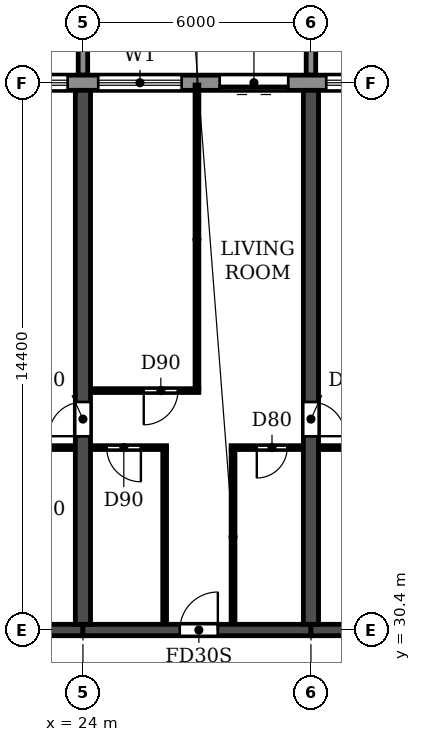
"""IFC4 building model, lengths in metres.
Left out: names, types, materials, properties, quantities, classifications, styles, units other than length and angle.
Written with IfcOpenShell. Run it as: python <this file> out.ifc"""

import sys

from ifc_helpers import new_model, si_unit, direction, frame, frame_2d, origin, place, context, subcontext, project, spatial, polyline, rectangle, outline, extrude, source, transform, mapped, element, fill, save


model = new_model("IFC4")
c1 = context("Model", 3, precision=1e-05, world=origin(), true_north=direction((0.0, 1.0)))
c2 = subcontext(c1, "Body", "Model", "MODEL_VIEW")
j1 = project(units=[si_unit("LENGTHUNIT", "METRE"), si_unit("PLANEANGLEUNIT", "RADIAN")], contexts=[c1])
p1 = place(None, origin())
s1 = spatial("IfcSite", under=j1, at=p1, CompositionType="ELEMENT")
p2 = place(p1, origin())
s2 = spatial("IfcBuilding", under=s1, at=p2, CompositionType="ELEMENT")
p3 = place(p2, frame((0.0, 0.0, 33.3)))
s3 = spatial("IfcBuildingStorey", under=s2, at=p3, CompositionType="ELEMENT", Elevation=33.3)
p4 = place(p3, frame((24.0, 30.55, 0.0), z_axis=(0.0, 0.0, 1.0), x_axis=(0.0, 1.0, 0.0)))
e1 = element("IfcWall", 1, at=p4, inside=s3, PredefinedType="SHEAR", context=c2, shape_type="SweptSolid", body=[
    extrude(rectangle(XDim=14.05, YDim=0.4, at=frame_2d((7.025, 0.0))), origin(), (0.0, 0.0, 1.0), 3.05),
])
p5 = place(p4, frame((4.95, 0.0, 0.0)))
e2 = element("IfcOpeningElement", 2, at=p5, cuts=e1, PredefinedType="OPENING", context=c2, shape_type="SweptSolid", body=[
    extrude(rectangle(XDim=0.9, YDim=2.1, at=frame_2d((0.45, 1.05))), frame((0.0, 0.21, 0.0), z_axis=(0.0, -1.0, 0.0), x_axis=(1.0, 0.0, 0.0)), (0.0, 0.0, 1.0), 0.42),
])
p6 = place(p3, frame((30.0, 30.55, 0.0), z_axis=(0.0, 0.0, 1.0), x_axis=(0.0, 1.0, 0.0)))
e3 = element("IfcWall", 3, at=p6, inside=s3, PredefinedType="SHEAR", context=c2, shape_type="SweptSolid", body=[
    extrude(rectangle(XDim=14.05, YDim=0.4, at=frame_2d((7.025, 0.0))), origin(), (0.0, 0.0, 1.0), 3.05),
])
p7 = place(p6, frame((4.95, 0.0, 0.0)))
e4 = element("IfcOpeningElement", 4, at=p7, cuts=e3, PredefinedType="OPENING", context=c2, shape_type="SweptSolid", body=[
    extrude(rectangle(XDim=0.9, YDim=2.1, at=frame_2d((0.45, 1.05))), frame((0.0, 0.21, 0.0), z_axis=(0.0, -1.0, 0.0), x_axis=(1.0, 0.0, 0.0)), (0.0, 0.0, 1.0), 0.42),
])
p8 = place(p3, frame((18.0, 30.4, 0.0), z_axis=(0.0, 0.0, 1.0), x_axis=(1.0, 0.0, 0.0)))
e5 = element("IfcWall", 5, at=p8, inside=s3, PredefinedType="SHEAR", context=c2, shape_type="SweptSolid", body=[
    extrude(rectangle(XDim=6.0, YDim=0.3, at=frame_2d((3.0, 0.0))), origin(), (0.0, 0.0, 1.0), 2.45),
])
p9 = place(p3, frame((24.0, 30.4, 0.0), z_axis=(0.0, 0.0, 1.0), x_axis=(1.0, 0.0, 0.0)))
e6 = element("IfcWall", 6, at=p9, inside=s3, PredefinedType="SHEAR", context=c2, shape_type="SweptSolid", body=[
    extrude(rectangle(XDim=6.0, YDim=0.3, at=frame_2d((3.0, 0.0))), origin(), (0.0, 0.0, 1.0), 2.45),
])
p10 = place(p9, frame((2.55, 0.0, 0.0)))
e7 = element("IfcOpeningElement", 7, at=p10, cuts=e6, PredefinedType="OPENING", context=c2, shape_type="SweptSolid", body=[
    extrude(rectangle(XDim=1.0, YDim=2.1, at=frame_2d((0.5, 1.05))), frame((0.0, 0.16, 0.0), z_axis=(0.0, -1.0, 0.0), x_axis=(1.0, 0.0, 0.0)), (0.0, 0.0, 1.0), 0.32),
])
p11 = place(p3, frame((30.0, 30.4, 0.0), z_axis=(0.0, 0.0, 1.0), x_axis=(1.0, 0.0, 0.0)))
e8 = element("IfcWall", 8, at=p11, inside=s3, PredefinedType="SHEAR", context=c2, shape_type="SweptSolid", body=[
    extrude(rectangle(XDim=6.0, YDim=0.3, at=frame_2d((3.0, 0.0))), origin(), (0.0, 0.0, 1.0), 2.45),
])
p12 = place(p3, frame((97.317, 44.8, 0.0), z_axis=(0.0, 0.0, 1.0), x_axis=(-1.0, 0.0, 0.0)))
e9 = element("IfcWall", 9, at=p12, inside=s3, PredefinedType="STANDARD", context=c2, shape_type="SweptSolid", body=[
    extrude(rectangle(XDim=92.634, YDim=0.4, at=frame_2d((46.317, 0.0))), origin(), (0.0, 0.0, 1.0), 3.05),
])
p13 = place(p12, frame((88.717, 0.0, 0.9)))
e10 = element("IfcOpeningElement", 10, at=p13, cuts=e9, PredefinedType="OPENING", context=c2, shape_type="SweptSolid", body=[
    extrude(rectangle(XDim=2.2, YDim=1.5, at=frame_2d((1.1, 0.75))), frame((0.0, 0.21, 0.0), z_axis=(0.0, -1.0, 0.0), x_axis=(1.0, 0.0, 0.0)), (0.0, 0.0, 1.0), 0.42),
])
p14 = place(p12, frame((85.917, 0.0, 0.0)))
e11 = element("IfcOpeningElement", 11, at=p14, cuts=e9, PredefinedType="OPENING", context=c2, shape_type="SweptSolid", body=[
    extrude(rectangle(XDim=1.8, YDim=2.4, at=frame_2d((0.9, 1.2))), frame((0.0, 0.21, 0.0), z_axis=(0.0, -1.0, 0.0), x_axis=(1.0, 0.0, 0.0)), (0.0, 0.0, 1.0), 0.42),
])
p15 = place(p12, frame((82.717, 0.0, 0.9)))
e12 = element("IfcOpeningElement", 12, at=p15, cuts=e9, PredefinedType="OPENING", context=c2, shape_type="SweptSolid", body=[
    extrude(rectangle(XDim=2.2, YDim=1.5, at=frame_2d((1.1, 0.75))), frame((0.0, 0.21, 0.0), z_axis=(0.0, -1.0, 0.0), x_axis=(1.0, 0.0, 0.0)), (0.0, 0.0, 1.0), 0.42),
])
p16 = place(p12, frame((79.917, 0.0, 0.0)))
e13 = element("IfcOpeningElement", 13, at=p16, cuts=e9, PredefinedType="OPENING", context=c2, shape_type="SweptSolid", body=[
    extrude(rectangle(XDim=1.8, YDim=2.4, at=frame_2d((0.9, 1.2))), frame((0.0, 0.21, 0.0), z_axis=(0.0, -1.0, 0.0), x_axis=(1.0, 0.0, 0.0)), (0.0, 0.0, 1.0), 0.42),
])
p17 = place(p12, frame((76.717, 0.0, 0.9)))
e14 = element("IfcOpeningElement", 14, at=p17, cuts=e9, PredefinedType="OPENING", context=c2, shape_type="SweptSolid", body=[
    extrude(rectangle(XDim=2.2, YDim=1.5, at=frame_2d((1.1, 0.75))), frame((0.0, 0.21, 0.0), z_axis=(0.0, -1.0, 0.0), x_axis=(1.0, 0.0, 0.0)), (0.0, 0.0, 1.0), 0.42),
])
p18 = place(p12, frame((73.717, 0.0, 0.9)))
e15 = element("IfcOpeningElement", 15, at=p18, cuts=e9, PredefinedType="OPENING", context=c2, shape_type="SweptSolid", body=[
    extrude(rectangle(XDim=2.2, YDim=1.5, at=frame_2d((1.1, 0.75))), frame((0.0, 0.21, 0.0), z_axis=(0.0, -1.0, 0.0), x_axis=(1.0, 0.0, 0.0)), (0.0, 0.0, 1.0), 0.42),
])
p19 = place(p12, frame((70.717, 0.0, 0.9)))
e16 = element("IfcOpeningElement", 16, at=p19, cuts=e9, PredefinedType="OPENING", context=c2, shape_type="SweptSolid", body=[
    extrude(rectangle(XDim=2.2, YDim=1.5, at=frame_2d((1.1, 0.75))), frame((0.0, 0.21, 0.0), z_axis=(0.0, -1.0, 0.0), x_axis=(1.0, 0.0, 0.0)), (0.0, 0.0, 1.0), 0.42),
])
p20 = place(p12, frame((67.917, 0.0, 0.0)))
e17 = element("IfcOpeningElement", 17, at=p20, cuts=e9, PredefinedType="OPENING", context=c2, shape_type="SweptSolid", body=[
    extrude(rectangle(XDim=1.8, YDim=2.4, at=frame_2d((0.9, 1.2))), frame((0.0, 0.21, 0.0), z_axis=(0.0, -1.0, 0.0), x_axis=(1.0, 0.0, 0.0)), (0.0, 0.0, 1.0), 0.42),
])
p21 = place(p12, frame((64.717, 0.0, 0.9)))
e18 = element("IfcOpeningElement", 18, at=p21, cuts=e9, PredefinedType="OPENING", context=c2, shape_type="SweptSolid", body=[
    extrude(rectangle(XDim=2.2, YDim=1.5, at=frame_2d((1.1, 0.75))), frame((0.0, 0.21, 0.0), z_axis=(0.0, -1.0, 0.0), x_axis=(1.0, 0.0, 0.0)), (0.0, 0.0, 1.0), 0.42),
])
p22 = place(p12, frame((61.717, 0.0, 0.9)))
e19 = element("IfcOpeningElement", 19, at=p22, cuts=e9, PredefinedType="OPENING", context=c2, shape_type="SweptSolid", body=[
    extrude(rectangle(XDim=2.2, YDim=1.5, at=frame_2d((1.1, 0.75))), frame((0.0, 0.21, 0.0), z_axis=(0.0, -1.0, 0.0), x_axis=(1.0, 0.0, 0.0)), (0.0, 0.0, 1.0), 0.42),
])
p23 = place(p12, frame((58.717, 0.0, 0.9)))
e20 = element("IfcOpeningElement", 20, at=p23, cuts=e9, PredefinedType="OPENING", context=c2, shape_type="SweptSolid", body=[
    extrude(rectangle(XDim=2.2, YDim=1.5, at=frame_2d((1.1, 0.75))), frame((0.0, 0.21, 0.0), z_axis=(0.0, -1.0, 0.0), x_axis=(1.0, 0.0, 0.0)), (0.0, 0.0, 1.0), 0.42),
])
p24 = place(p12, frame((55.917, 0.0, 0.0)))
e21 = element("IfcOpeningElement", 21, at=p24, cuts=e9, PredefinedType="OPENING", context=c2, shape_type="SweptSolid", body=[
    extrude(rectangle(XDim=1.8, YDim=2.4, at=frame_2d((0.9, 1.2))), frame((0.0, 0.21, 0.0), z_axis=(0.0, -1.0, 0.0), x_axis=(1.0, 0.0, 0.0)), (0.0, 0.0, 1.0), 0.42),
])
p25 = place(p12, frame((52.717, 0.0, 0.9)))
e22 = element("IfcOpeningElement", 22, at=p25, cuts=e9, PredefinedType="OPENING", context=c2, shape_type="SweptSolid", body=[
    extrude(rectangle(XDim=2.2, YDim=1.5, at=frame_2d((1.1, 0.75))), frame((0.0, 0.21, 0.0), z_axis=(0.0, -1.0, 0.0), x_axis=(1.0, 0.0, 0.0)), (0.0, 0.0, 1.0), 0.42),
])
p26 = place(p12, frame((49.717, 0.0, 0.9)))
e23 = element("IfcOpeningElement", 23, at=p26, cuts=e9, PredefinedType="OPENING", context=c2, shape_type="SweptSolid", body=[
    extrude(rectangle(XDim=2.2, YDim=1.5, at=frame_2d((1.1, 0.75))), frame((0.0, 0.21, 0.0), z_axis=(0.0, -1.0, 0.0), x_axis=(1.0, 0.0, 0.0)), (0.0, 0.0, 1.0), 0.42),
])
p27 = place(p12, frame((46.717, 0.0, 0.9)))
e24 = element("IfcOpeningElement", 24, at=p27, cuts=e9, PredefinedType="OPENING", context=c2, shape_type="SweptSolid", body=[
    extrude(rectangle(XDim=2.2, YDim=1.5, at=frame_2d((1.1, 0.75))), frame((0.0, 0.21, 0.0), z_axis=(0.0, -1.0, 0.0), x_axis=(1.0, 0.0, 0.0)), (0.0, 0.0, 1.0), 0.42),
])
p28 = place(p12, frame((43.917, 0.0, 0.0)))
e25 = element("IfcOpeningElement", 25, at=p28, cuts=e9, PredefinedType="OPENING", context=c2, shape_type="SweptSolid", body=[
    extrude(rectangle(XDim=1.8, YDim=2.4, at=frame_2d((0.9, 1.2))), frame((0.0, 0.21, 0.0), z_axis=(0.0, -1.0, 0.0), x_axis=(1.0, 0.0, 0.0)), (0.0, 0.0, 1.0), 0.42),
])
p29 = place(p12, frame((40.717, 0.0, 0.9)))
e26 = element("IfcOpeningElement", 26, at=p29, cuts=e9, PredefinedType="OPENING", context=c2, shape_type="SweptSolid", body=[
    extrude(rectangle(XDim=2.2, YDim=1.5, at=frame_2d((1.1, 0.75))), frame((0.0, 0.21, 0.0), z_axis=(0.0, -1.0, 0.0), x_axis=(1.0, 0.0, 0.0)), (0.0, 0.0, 1.0), 0.42),
])
p30 = place(p12, frame((37.717, 0.0, 0.9)))
e27 = element("IfcOpeningElement", 27, at=p30, cuts=e9, PredefinedType="OPENING", context=c2, shape_type="SweptSolid", body=[
    extrude(rectangle(XDim=2.2, YDim=1.5, at=frame_2d((1.1, 0.75))), frame((0.0, 0.21, 0.0), z_axis=(0.0, -1.0, 0.0), x_axis=(1.0, 0.0, 0.0)), (0.0, 0.0, 1.0), 0.42),
])
p31 = place(p12, frame((34.717, 0.0, 0.9)))
e28 = element("IfcOpeningElement", 28, at=p31, cuts=e9, PredefinedType="OPENING", context=c2, shape_type="SweptSolid", body=[
    extrude(rectangle(XDim=2.2, YDim=1.5, at=frame_2d((1.1, 0.75))), frame((0.0, 0.21, 0.0), z_axis=(0.0, -1.0, 0.0), x_axis=(1.0, 0.0, 0.0)), (0.0, 0.0, 1.0), 0.42),
])
p32 = place(p12, frame((31.917, 0.0, 0.0)))
e29 = element("IfcOpeningElement", 29, at=p32, cuts=e9, PredefinedType="OPENING", context=c2, shape_type="SweptSolid", body=[
    extrude(rectangle(XDim=1.8, YDim=2.4, at=frame_2d((0.9, 1.2))), frame((0.0, 0.21, 0.0), z_axis=(0.0, -1.0, 0.0), x_axis=(1.0, 0.0, 0.0)), (0.0, 0.0, 1.0), 0.42),
])
p33 = place(p12, frame((28.717, 0.0, 0.9)))
e30 = element("IfcOpeningElement", 30, at=p33, cuts=e9, PredefinedType="OPENING", context=c2, shape_type="SweptSolid", body=[
    extrude(rectangle(XDim=2.2, YDim=1.5, at=frame_2d((1.1, 0.75))), frame((0.0, 0.21, 0.0), z_axis=(0.0, -1.0, 0.0), x_axis=(1.0, 0.0, 0.0)), (0.0, 0.0, 1.0), 0.42),
])
p34 = place(p12, frame((25.717, 0.0, 0.9)))
e31 = element("IfcOpeningElement", 31, at=p34, cuts=e9, PredefinedType="OPENING", context=c2, shape_type="SweptSolid", body=[
    extrude(rectangle(XDim=2.2, YDim=1.5, at=frame_2d((1.1, 0.75))), frame((0.0, 0.21, 0.0), z_axis=(0.0, -1.0, 0.0), x_axis=(1.0, 0.0, 0.0)), (0.0, 0.0, 1.0), 0.42),
])
p35 = place(p12, frame((22.917, 0.0, 0.0)))
e32 = element("IfcOpeningElement", 32, at=p35, cuts=e9, PredefinedType="OPENING", context=c2, shape_type="SweptSolid", body=[
    extrude(rectangle(XDim=1.8, YDim=2.4, at=frame_2d((0.9, 1.2))), frame((0.0, 0.21, 0.0), z_axis=(0.0, -1.0, 0.0), x_axis=(1.0, 0.0, 0.0)), (0.0, 0.0, 1.0), 0.42),
])
p36 = place(p12, frame((19.717, 0.0, 0.9)))
e33 = element("IfcOpeningElement", 33, at=p36, cuts=e9, PredefinedType="OPENING", context=c2, shape_type="SweptSolid", body=[
    extrude(rectangle(XDim=2.2, YDim=1.5, at=frame_2d((1.1, 0.75))), frame((0.0, 0.21, 0.0), z_axis=(0.0, -1.0, 0.0), x_axis=(1.0, 0.0, 0.0)), (0.0, 0.0, 1.0), 0.42),
])
p37 = place(p12, frame((16.717, 0.0, 0.9)))
e34 = element("IfcOpeningElement", 34, at=p37, cuts=e9, PredefinedType="OPENING", context=c2, shape_type="SweptSolid", body=[
    extrude(rectangle(XDim=2.2, YDim=1.5, at=frame_2d((1.1, 0.75))), frame((0.0, 0.21, 0.0), z_axis=(0.0, -1.0, 0.0), x_axis=(1.0, 0.0, 0.0)), (0.0, 0.0, 1.0), 0.42),
])
p38 = place(p12, frame((13.917, 0.0, 0.0)))
e35 = element("IfcOpeningElement", 35, at=p38, cuts=e9, PredefinedType="OPENING", context=c2, shape_type="SweptSolid", body=[
    extrude(rectangle(XDim=1.8, YDim=2.4, at=frame_2d((0.9, 1.2))), frame((0.0, 0.21, 0.0), z_axis=(0.0, -1.0, 0.0), x_axis=(1.0, 0.0, 0.0)), (0.0, 0.0, 1.0), 0.42),
])
p39 = place(p12, frame((10.717, 0.0, 0.9)))
e36 = element("IfcOpeningElement", 36, at=p39, cuts=e9, PredefinedType="OPENING", context=c2, shape_type="SweptSolid", body=[
    extrude(rectangle(XDim=2.2, YDim=1.5, at=frame_2d((1.1, 0.75))), frame((0.0, 0.21, 0.0), z_axis=(0.0, -1.0, 0.0), x_axis=(1.0, 0.0, 0.0)), (0.0, 0.0, 1.0), 0.42),
])
p40 = place(p12, frame((7.917, 0.0, 0.0)))
e37 = element("IfcOpeningElement", 37, at=p40, cuts=e9, PredefinedType="OPENING", context=c2, shape_type="SweptSolid", body=[
    extrude(rectangle(XDim=1.8, YDim=2.4, at=frame_2d((0.9, 1.2))), frame((0.0, 0.21, 0.0), z_axis=(0.0, -1.0, 0.0), x_axis=(1.0, 0.0, 0.0)), (0.0, 0.0, 1.0), 0.42),
])
p41 = place(p12, frame((4.717, 0.0, 0.9)))
e38 = element("IfcOpeningElement", 38, at=p41, cuts=e9, PredefinedType="OPENING", context=c2, shape_type="SweptSolid", body=[
    extrude(rectangle(XDim=2.2, YDim=1.5, at=frame_2d((1.1, 0.75))), frame((0.0, 0.21, 0.0), z_axis=(0.0, -1.0, 0.0), x_axis=(1.0, 0.0, 0.0)), (0.0, 0.0, 1.0), 0.42),
])
p42 = place(p12, frame((1.917, 0.0, 0.0)))
e39 = element("IfcOpeningElement", 39, at=p42, cuts=e9, PredefinedType="OPENING", context=c2, shape_type="SweptSolid", body=[
    extrude(rectangle(XDim=1.8, YDim=2.4, at=frame_2d((0.9, 1.2))), frame((0.0, 0.21, 0.0), z_axis=(0.0, -1.0, 0.0), x_axis=(1.0, 0.0, 0.0)), (0.0, 0.0, 1.0), 0.42),
])
m1 = source(origin(), c2, "Body", "SweptSolid", [
    extrude(outline(polyline([(0.0, 0.0), (0.25, 0.0), (0.25, 3.1), (0.0, 3.1), (0.0, 0.0)])), origin(), (0.0, 0.0, 1.0), 3.1),
])
for number, where in (
    (40, (23.875, 45.0, 0.0)),
    (41, (29.875, 45.0, 0.0)),
):
    element("IfcWall", number, at=place(p3, frame(where)), inside=s3, PredefinedType="STANDARD", context=c2, shape_type="MappedRepresentation", body=[
        mapped(m1, transform((0.0, 0.0, 0.0))),
    ])
p43 = place(p3, frame((20.9, 35.2, 0.0), z_axis=(0.0, 0.0, 1.0), x_axis=(1.0, 0.0, 0.0)))
e42 = element("IfcWall", 42, at=p43, inside=s3, PredefinedType="PARTITIONING", context=c2, shape_type="SweptSolid", body=[
    extrude(rectangle(XDim=2.89, YDim=0.1, at=frame_2d((1.445, 0.0))), origin(), (0.0, 0.0, 1.0), 3.05),
])
p44 = place(p43, frame((1.2, 0.0, 0.0)))
e43 = element("IfcOpeningElement", 43, at=p44, cuts=e42, PredefinedType="OPENING", context=c2, shape_type="SweptSolid", body=[
    extrude(rectangle(XDim=0.8, YDim=2.1, at=frame_2d((0.4, 1.05))), frame((0.0, 0.06, 0.0), z_axis=(0.0, -1.0, 0.0), x_axis=(1.0, 0.0, 0.0)), (0.0, 0.0, 1.0), 0.12),
])
p45 = place(p3, frame((24.21, 35.2, 0.0), z_axis=(0.0, 0.0, 1.0), x_axis=(1.0, 0.0, 0.0)))
e44 = element("IfcWall", 44, at=p45, inside=s3, PredefinedType="PARTITIONING", context=c2, shape_type="SweptSolid", body=[
    extrude(rectangle(XDim=1.99, YDim=0.1, at=frame_2d((0.995, 0.0))), origin(), (0.0, 0.0, 1.0), 3.05),
])
p46 = place(p45, frame((0.415, 0.0, 0.0)))
e45 = element("IfcOpeningElement", 45, at=p46, cuts=e44, PredefinedType="OPENING", context=c2, shape_type="SweptSolid", body=[
    extrude(rectangle(XDim=0.9, YDim=2.1, at=frame_2d((0.45, 1.05))), frame((0.0, 0.06, 0.0), z_axis=(0.0, -1.0, 0.0), x_axis=(1.0, 0.0, 0.0)), (0.0, 0.0, 1.0), 0.12),
])
p47 = place(p3, frame((27.9, 35.2, 0.0), z_axis=(0.0, 0.0, 1.0), x_axis=(1.0, 0.0, 0.0)))
e46 = element("IfcWall", 46, at=p47, inside=s3, PredefinedType="PARTITIONING", context=c2, shape_type="SweptSolid", body=[
    extrude(rectangle(XDim=1.89, YDim=0.1, at=frame_2d((0.945, 0.0))), origin(), (0.0, 0.0, 1.0), 3.05),
])
p48 = place(p47, frame((0.675, 0.0, 0.0)))
e47 = element("IfcOpeningElement", 47, at=p48, cuts=e46, PredefinedType="OPENING", context=c2, shape_type="SweptSolid", body=[
    extrude(rectangle(XDim=0.8, YDim=2.1, at=frame_2d((0.4, 1.05))), frame((0.0, 0.06, 0.0), z_axis=(0.0, -1.0, 0.0), x_axis=(1.0, 0.0, 0.0)), (0.0, 0.0, 1.0), 0.12),
])
p49 = place(p3, frame((30.21, 35.2, 0.0), z_axis=(0.0, 0.0, 1.0), x_axis=(1.0, 0.0, 0.0)))
e48 = element("IfcWall", 48, at=p49, inside=s3, PredefinedType="PARTITIONING", context=c2, shape_type="SweptSolid", body=[
    extrude(rectangle(XDim=2.69, YDim=0.1, at=frame_2d((1.345, 0.0))), origin(), (0.0, 0.0, 1.0), 3.05),
])
p50 = place(p49, frame((0.89, 0.0, 0.0)))
e49 = element("IfcOpeningElement", 49, at=p50, cuts=e48, PredefinedType="OPENING", context=c2, shape_type="SweptSolid", body=[
    extrude(rectangle(XDim=0.8, YDim=2.1, at=frame_2d((0.4, 1.05))), frame((0.0, 0.06, 0.0), z_axis=(0.0, -1.0, 0.0), x_axis=(1.0, 0.0, 0.0)), (0.0, 0.0, 1.0), 0.12),
])
p51 = place(p3, frame((24.21, 36.7, 0.0), z_axis=(0.0, 0.0, 1.0), x_axis=(1.0, 0.0, 0.0)))
e50 = element("IfcWall", 50, at=p51, inside=s3, PredefinedType="PARTITIONING", context=c2, shape_type="SweptSolid", body=[
    extrude(rectangle(XDim=2.84, YDim=0.1, at=frame_2d((1.42, 0.0))), origin(), (0.0, 0.0, 1.0), 3.05),
])
p52 = place(p51, frame((1.39, 0.0, 0.0)))
e51 = element("IfcOpeningElement", 51, at=p52, cuts=e50, PredefinedType="OPENING", context=c2, shape_type="SweptSolid", body=[
    extrude(rectangle(XDim=0.9, YDim=2.1, at=frame_2d((0.45, 1.05))), frame((0.0, 0.06, 0.0), z_axis=(0.0, -1.0, 0.0), x_axis=(1.0, 0.0, 0.0)), (0.0, 0.0, 1.0), 0.12),
])
p53 = place(p3, frame((26.15, 30.56, 0.0), z_axis=(0.0, 0.0, 1.0), x_axis=(0.0, 1.0, 0.0)))
e52 = element("IfcWall", 52, at=p53, inside=s3, PredefinedType="PARTITIONING", context=c2, shape_type="SweptSolid", body=[
    extrude(rectangle(XDim=4.59, YDim=0.1, at=frame_2d((2.295, 0.0))), origin(), (0.0, 0.0, 1.0), 3.05),
])
p54 = place(p3, frame((27.0, 36.75, 0.0), z_axis=(0.0, 0.0, 1.0), x_axis=(0.0, 1.0, 0.0)))
e53 = element("IfcWall", 53, at=p54, inside=s3, PredefinedType="PARTITIONING", context=c2, shape_type="SweptSolid", body=[
    extrude(rectangle(XDim=7.99, YDim=0.1, at=frame_2d((3.995, 0.0))), origin(), (0.0, 0.0, 1.0), 3.05),
])
p55 = place(p3, frame((27.95, 30.56, 0.0), z_axis=(0.0, 0.0, 1.0), x_axis=(0.0, 1.0, 0.0)))
e54 = element("IfcWall", 54, at=p55, inside=s3, PredefinedType="PARTITIONING", context=c2, shape_type="SweptSolid", body=[
    extrude(rectangle(XDim=4.59, YDim=0.1, at=frame_2d((2.295, 0.0))), origin(), (0.0, 0.0, 1.0), 3.05),
])
p56 = place(p18, origin())
e55 = element("IfcWindow", 55, at=p56, inside=s3, PartitioningType="DOUBLE_PANEL_HORIZONTAL", PredefinedType="WINDOW", context=c2, shape_type="SweptSolid", body=[
    extrude(rectangle(XDim=2.2, YDim=1.5, at=frame_2d((1.1, 0.75))), frame((0.0, 0.03, 0.0), z_axis=(0.0, -1.0, 0.0), x_axis=(1.0, 0.0, 0.0)), (0.0, 0.0, 1.0), 0.06),
])
fill(e15, e55)
p57 = place(p19, origin())
e56 = element("IfcWindow", 56, at=p57, inside=s3, PartitioningType="DOUBLE_PANEL_HORIZONTAL", PredefinedType="WINDOW", context=c2, shape_type="SweptSolid", body=[
    extrude(rectangle(XDim=2.2, YDim=1.5, at=frame_2d((1.1, 0.75))), frame((0.0, 0.03, 0.0), z_axis=(0.0, -1.0, 0.0), x_axis=(1.0, 0.0, 0.0)), (0.0, 0.0, 1.0), 0.06),
])
fill(e16, e56)
p58 = place(p20, origin())
e57 = element("IfcDoor", 57, at=p58, inside=s3, OperationType="DOUBLE_DOOR_SLIDING", PredefinedType="DOOR", context=c2, shape_type="SweptSolid", body=[
    extrude(rectangle(XDim=1.8, YDim=2.4, at=frame_2d((0.9, 1.2))), frame((0.0, 0.025, 0.0), z_axis=(0.0, -1.0, 0.0), x_axis=(1.0, 0.0, 0.0)), (0.0, 0.0, 1.0), 0.05),
])
fill(e17, e57)
p59 = place(p21, origin())
e58 = element("IfcWindow", 58, at=p59, inside=s3, PartitioningType="DOUBLE_PANEL_HORIZONTAL", PredefinedType="WINDOW", context=c2, shape_type="SweptSolid", body=[
    extrude(rectangle(XDim=2.2, YDim=1.5, at=frame_2d((1.1, 0.75))), frame((0.0, 0.03, 0.0), z_axis=(0.0, -1.0, 0.0), x_axis=(1.0, 0.0, 0.0)), (0.0, 0.0, 1.0), 0.06),
])
fill(e18, e58)
p60 = place(p5, origin())
e59 = element("IfcDoor", 59, at=p60, inside=s3, OperationType="SINGLE_SWING_LEFT", PredefinedType="DOOR", context=c2, shape_type="SweptSolid", body=[
    extrude(rectangle(XDim=0.9, YDim=2.1, at=frame_2d((0.45, 1.05))), frame((0.0, 0.025, 0.0), z_axis=(0.0, -1.0, 0.0), x_axis=(1.0, 0.0, 0.0)), (0.0, 0.0, 1.0), 0.05),
])
fill(e2, e59)
p61 = place(p46, frame((0.9, 0.0, 0.0), z_axis=(0.0, 0.0, 1.0), x_axis=(-1.0, 0.0, 0.0)))
e60 = element("IfcDoor", 60, at=p61, inside=s3, OperationType="SINGLE_SWING_LEFT", PredefinedType="DOOR", context=c2, shape_type="SweptSolid", body=[
    extrude(rectangle(XDim=0.9, YDim=2.1, at=frame_2d((0.45, 1.05))), frame((0.0, 0.025, 0.0), z_axis=(0.0, -1.0, 0.0), x_axis=(1.0, 0.0, 0.0)), (0.0, 0.0, 1.0), 0.05),
])
fill(e45, e60)
p62 = place(p52, frame((0.9, 0.0, 0.0), z_axis=(0.0, 0.0, 1.0), x_axis=(-1.0, 0.0, 0.0)))
e61 = element("IfcDoor", 61, at=p62, inside=s3, OperationType="SINGLE_SWING_RIGHT", PredefinedType="DOOR", context=c2, shape_type="SweptSolid", body=[
    extrude(rectangle(XDim=0.9, YDim=2.1, at=frame_2d((0.45, 1.05))), frame((0.0, 0.025, 0.0), z_axis=(0.0, -1.0, 0.0), x_axis=(1.0, 0.0, 0.0)), (0.0, 0.0, 1.0), 0.05),
])
fill(e51, e61)
p63 = place(p10, origin())
e62 = element("IfcDoor", 62, at=p63, inside=s3, OperationType="SINGLE_SWING_RIGHT", PredefinedType="DOOR", context=c2, shape_type="SweptSolid", body=[
    extrude(rectangle(XDim=1.0, YDim=2.1, at=frame_2d((0.5, 1.05))), frame((0.0, 0.025, 0.0), z_axis=(0.0, -1.0, 0.0), x_axis=(1.0, 0.0, 0.0)), (0.0, 0.0, 1.0), 0.05),
])
fill(e7, e62)
p64 = place(p48, frame((0.8, 0.0, 0.0), z_axis=(0.0, 0.0, 1.0), x_axis=(-1.0, 0.0, 0.0)))
e63 = element("IfcDoor", 63, at=p64, inside=s3, OperationType="SINGLE_SWING_RIGHT", PredefinedType="DOOR", context=c2, shape_type="SweptSolid", body=[
    extrude(rectangle(XDim=0.8, YDim=2.1, at=frame_2d((0.4, 1.05))), frame((0.0, 0.025, 0.0), z_axis=(0.0, -1.0, 0.0), x_axis=(1.0, 0.0, 0.0)), (0.0, 0.0, 1.0), 0.05),
])
fill(e47, e63)
p65 = place(p7, frame((0.9, 0.0, 0.0), z_axis=(0.0, 0.0, 1.0), x_axis=(-1.0, 0.0, 0.0)))
e64 = element("IfcDoor", 64, at=p65, inside=s3, OperationType="SINGLE_SWING_RIGHT", PredefinedType="DOOR", context=c2, shape_type="SweptSolid", body=[
    extrude(rectangle(XDim=0.9, YDim=2.1, at=frame_2d((0.45, 1.05))), frame((0.0, 0.025, 0.0), z_axis=(0.0, -1.0, 0.0), x_axis=(1.0, 0.0, 0.0)), (0.0, 0.0, 1.0), 0.05),
])
fill(e4, e64)
save(model, sys.argv[1])
